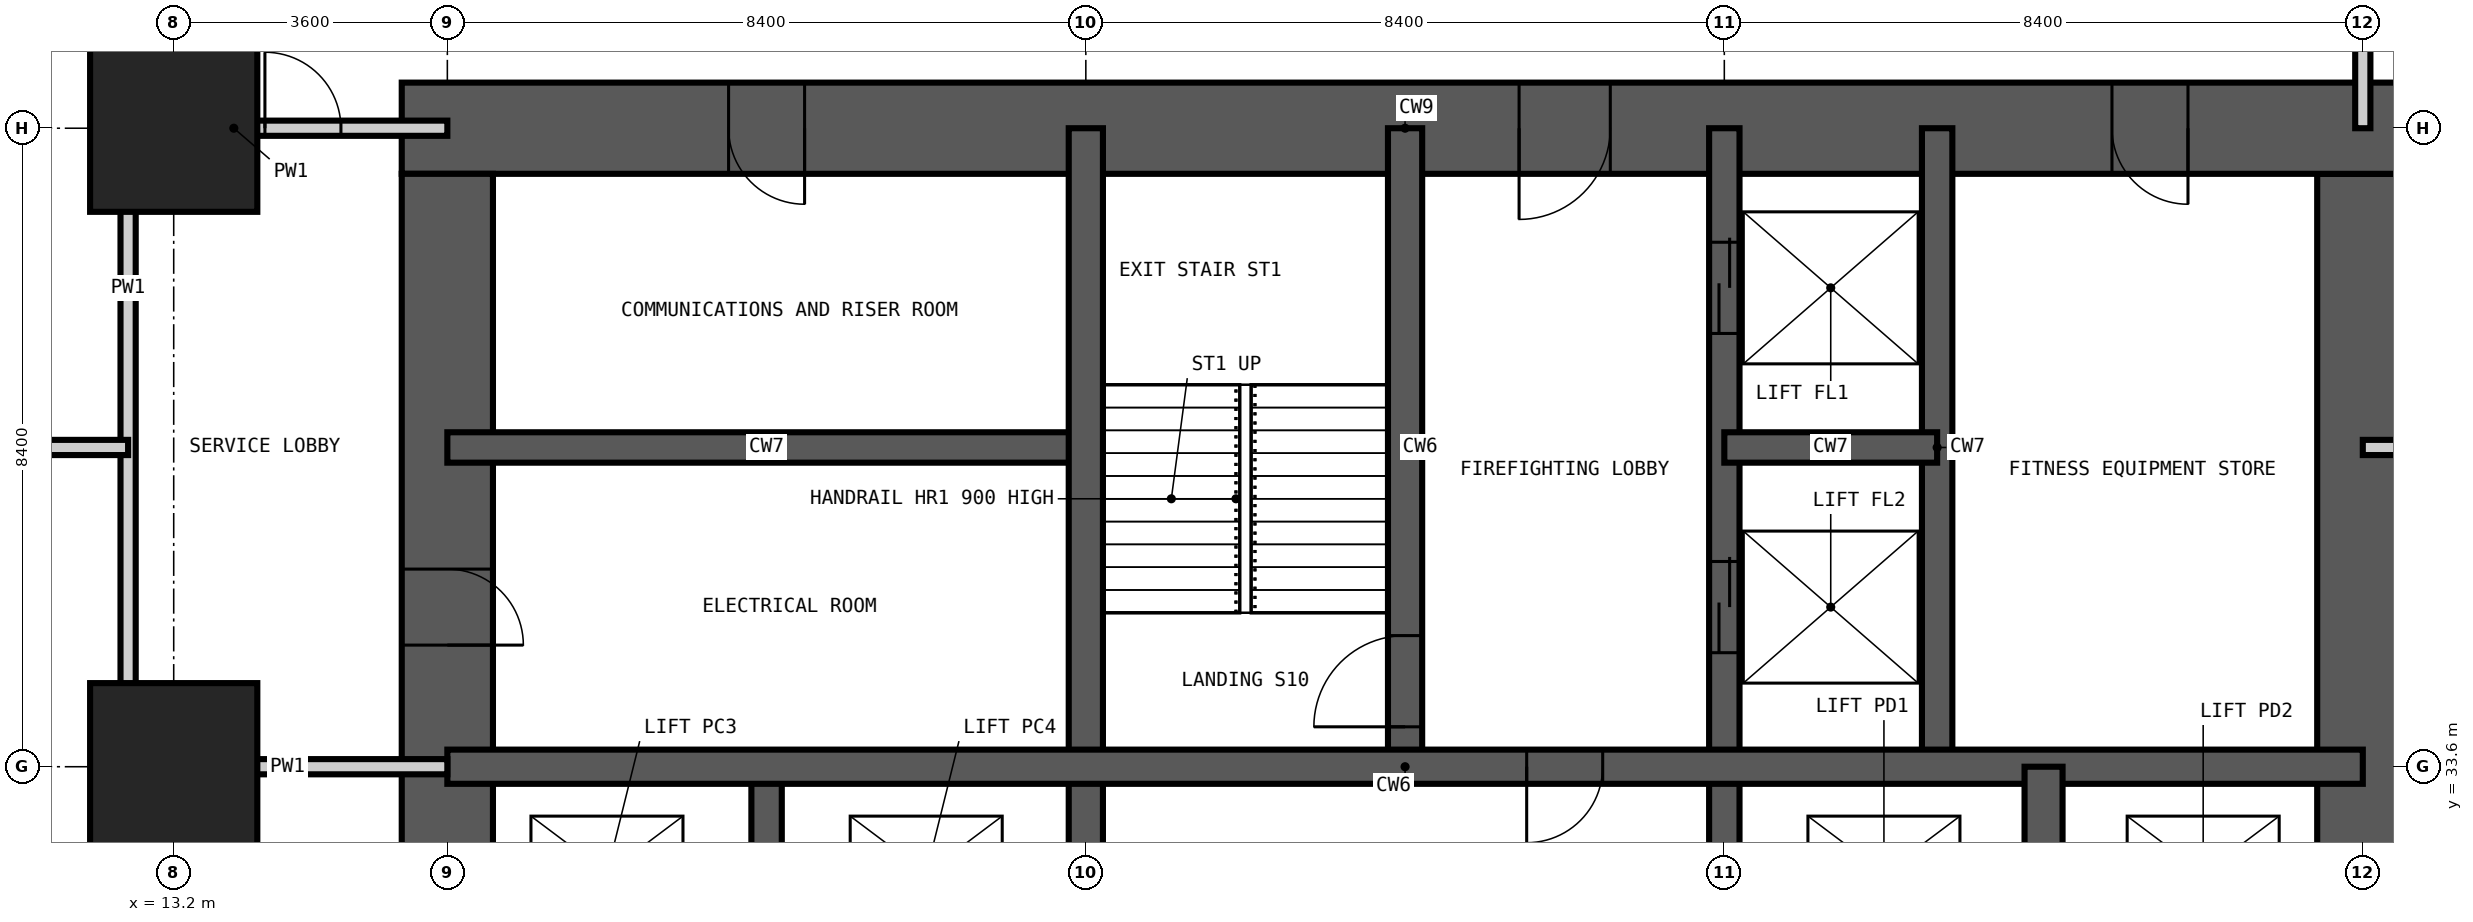
"""IFC4 building model, lengths in metres.
Left out: names, types, materials, properties, quantities, classifications, styles, units other than length and angle.
Written with IfcOpenShell. Run it as: python <this file> out.ifc"""

import sys

from ifc_helpers import new_model, si_unit, direction, frame, frame_2d, origin, origin_2d, place, context, subcontext, project, spatial, rectangle, extrude, element, fill, save


model = new_model("IFC4")
c1 = context("Model", 3, precision=1e-05, world=origin(), true_north=direction((0.0, 1.0)))
c2 = subcontext(c1, "Body", "Model", "MODEL_VIEW")
j1 = project(units=[si_unit("LENGTHUNIT", "METRE"), si_unit("PLANEANGLEUNIT", "RADIAN")], contexts=[c1])
p1 = place(None, origin())
s1 = spatial("IfcSite", under=j1, at=p1, CompositionType="ELEMENT")
p2 = place(p1, origin())
s2 = spatial("IfcBuilding", under=s1, at=p2, CompositionType="ELEMENT")
p3 = place(p2, frame((0.0, 0.0, 147.6)))
s3 = spatial("IfcBuildingStorey", under=s2, at=p3, CompositionType="ELEMENT", Elevation=147.6)
for number, where, z_axis, x_axis in (
    (1, (13.2, 33.6, -0.35), (0.0, 0.0, 1.0), (1.0, 0.0, 0.0)),
    (2, (13.2, 42.0, -0.35), (0.0, 0.0, 1.0), (1.0, 0.0, 0.0)),
):
    element("IfcColumn", number, at=place(p3, frame(where, z_axis=z_axis, x_axis=x_axis)), inside=s3, PredefinedType="COLUMN", context=c2, shape_type="SweptSolid", body=[
        extrude(rectangle(XDim=2.2, YDim=2.2, at=origin_2d()), origin(), (0.0, 0.0, 1.0), 5.95),
    ])
p4 = place(p3, frame((42.0, 17.4, -0.35), z_axis=(0.0, 0.0, 1.0), x_axis=(0.0, 1.0, 0.0)))
e3 = element("IfcWall", 3, at=p4, inside=s3, PredefinedType="SHEAR", context=c2, shape_type="SweptSolid", body=[
    extrude(rectangle(XDim=24.0, YDim=1.2, at=frame_2d((12.0, 0.0))), origin(), (0.0, 0.0, 1.0), 5.95),
])
p5 = place(p4, frame((0.2, 0.0, 0.35)))
e4 = element("IfcOpeningElement", 4, at=p5, cuts=e3, PredefinedType="OPENING", context=c2, shape_type="SweptSolid", body=[
    extrude(rectangle(XDim=1.2, YDim=2.2, at=frame_2d((0.6, 1.1))), frame((0.0, 0.61, 0.0), z_axis=(0.0, -1.0, 0.0), x_axis=(1.0, 0.0, 0.0)), (0.0, 0.0, 1.0), 1.22),
])
p6 = place(p4, frame((11.1, 0.0, 0.35)))
e5 = element("IfcOpeningElement", 5, at=p6, cuts=e3, PredefinedType="OPENING", context=c2, shape_type="SweptSolid", body=[
    extrude(rectangle(XDim=1.8, YDim=2.2, at=frame_2d((0.9, 1.1))), frame((0.0, 0.61, 0.0), z_axis=(0.0, -1.0, 0.0), x_axis=(1.0, 0.0, 0.0)), (0.0, 0.0, 1.0), 1.22),
])
p7 = place(p3, frame((42.6, 42.0, -0.35), z_axis=(0.0, 0.0, 1.0), x_axis=(-1.0, 0.0, 0.0)))
e6 = element("IfcWall", 6, at=p7, inside=s3, PredefinedType="SHEAR", context=c2, shape_type="SweptSolid", body=[
    extrude(rectangle(XDim=26.4, YDim=1.2, at=frame_2d((13.2, 0.0))), origin(), (0.0, 0.0, 1.0), 5.95),
])
p8 = place(p7, frame((21.1, 0.0, 0.35)))
e7 = element("IfcOpeningElement", 7, at=p8, cuts=e6, PredefinedType="OPENING", context=c2, shape_type="SweptSolid", body=[
    extrude(rectangle(XDim=1.0, YDim=2.1, at=frame_2d((0.5, 1.05))), frame((0.0, 0.61, 0.0), z_axis=(0.0, -1.0, 0.0), x_axis=(1.0, 0.0, 0.0)), (0.0, 0.0, 1.0), 1.22),
])
p9 = place(p7, frame((10.5, 0.0, 0.35)))
e8 = element("IfcOpeningElement", 8, at=p9, cuts=e6, PredefinedType="OPENING", context=c2, shape_type="SweptSolid", body=[
    extrude(rectangle(XDim=1.2, YDim=2.2, at=frame_2d((0.6, 1.1))), frame((0.0, 0.61, 0.0), z_axis=(0.0, -1.0, 0.0), x_axis=(1.0, 0.0, 0.0)), (0.0, 0.0, 1.0), 1.22),
])
p10 = place(p7, frame((2.9, 0.0, 0.35)))
e9 = element("IfcOpeningElement", 9, at=p10, cuts=e6, PredefinedType="OPENING", context=c2, shape_type="SweptSolid", body=[
    extrude(rectangle(XDim=1.0, YDim=2.1, at=frame_2d((0.5, 1.05))), frame((0.0, 0.61, 0.0), z_axis=(0.0, -1.0, 0.0), x_axis=(1.0, 0.0, 0.0)), (0.0, 0.0, 1.0), 1.22),
])
p11 = place(p3, frame((16.8, 41.4, -0.35), z_axis=(0.0, 0.0, 1.0), x_axis=(0.0, -1.0, 0.0)))
e10 = element("IfcWall", 10, at=p11, inside=s3, PredefinedType="SHEAR", context=c2, shape_type="SweptSolid", body=[
    extrude(rectangle(XDim=24.0, YDim=1.2, at=frame_2d((12.0, 0.0))), origin(), (0.0, 0.0, 1.0), 5.95),
])
p12 = place(p11, frame((11.1, 0.0, 0.35)))
e11 = element("IfcOpeningElement", 11, at=p12, cuts=e10, PredefinedType="OPENING", context=c2, shape_type="SweptSolid", body=[
    extrude(rectangle(XDim=1.8, YDim=2.2, at=frame_2d((0.9, 1.1))), frame((0.0, 0.61, 0.0), z_axis=(0.0, -1.0, 0.0), x_axis=(1.0, 0.0, 0.0)), (0.0, 0.0, 1.0), 1.22),
])
p13 = place(p11, frame((19.5, 0.0, 0.35)))
e12 = element("IfcOpeningElement", 12, at=p13, cuts=e10, PredefinedType="OPENING", context=c2, shape_type="SweptSolid", body=[
    extrude(rectangle(XDim=1.8, YDim=2.2, at=frame_2d((0.9, 1.1))), frame((0.0, 0.61, 0.0), z_axis=(0.0, -1.0, 0.0), x_axis=(1.0, 0.0, 0.0)), (0.0, 0.0, 1.0), 1.22),
])
p14 = place(p11, frame((5.2, 0.0, 0.35)))
e13 = element("IfcOpeningElement", 13, at=p14, cuts=e10, PredefinedType="OPENING", context=c2, shape_type="SweptSolid", body=[
    extrude(rectangle(XDim=1.0, YDim=2.1, at=frame_2d((0.5, 1.05))), frame((0.0, 0.61, 0.0), z_axis=(0.0, -1.0, 0.0), x_axis=(1.0, 0.0, 0.0)), (0.0, 0.0, 1.0), 1.22),
])
p15 = place(p3, frame((21.0, 30.8, -0.35), z_axis=(0.0, 0.0, 1.0), x_axis=(0.0, 1.0, 0.0)))
e14 = element("IfcWall", 14, at=p15, inside=s3, PredefinedType="SHEAR", context=c2, shape_type="SweptSolid", body=[
    extrude(rectangle(XDim=2.8, YDim=0.4, at=frame_2d((1.4, 0.0))), origin(), (0.0, 0.0, 1.0), 5.95),
])
p16 = place(p3, frame((33.6, 16.8, -0.35), z_axis=(0.0, 0.0, 1.0), x_axis=(0.0, 1.0, 0.0)))
e15 = element("IfcWall", 15, at=p16, inside=s3, PredefinedType="SHEAR", context=c2, shape_type="SweptSolid", body=[
    extrude(rectangle(XDim=25.2, YDim=0.4, at=frame_2d((12.6, 0.0))), origin(), (0.0, 0.0, 1.0), 5.95),
])
p17 = place(p16, frame((22.5, 0.0, 0.35)))
e16 = element("IfcOpeningElement", 16, at=p17, cuts=e15, PredefinedType="OPENING", context=c2, shape_type="SweptSolid", body=[
    extrude(rectangle(XDim=1.2, YDim=2.2, at=frame_2d((0.6, 1.1))), frame((0.0, 0.21, 0.0), z_axis=(0.0, -1.0, 0.0), x_axis=(1.0, 0.0, 0.0)), (0.0, 0.0, 1.0), 0.42),
])
p18 = place(p16, frame((18.3, 0.0, 0.35)))
e17 = element("IfcOpeningElement", 17, at=p18, cuts=e15, PredefinedType="OPENING", context=c2, shape_type="SweptSolid", body=[
    extrude(rectangle(XDim=1.2, YDim=2.2, at=frame_2d((0.6, 1.1))), frame((0.0, 0.21, 0.0), z_axis=(0.0, -1.0, 0.0), x_axis=(1.0, 0.0, 0.0)), (0.0, 0.0, 1.0), 0.42),
])
for number, where, z_axis, x_axis in (
    (18, (36.4, 33.6, -0.35), (0.0, 0.0, 1.0), (0.0, 1.0, 0.0)),
    (19, (16.8, 37.8, -0.35), (0.0, 0.0, 1.0), (1.0, 0.0, 0.0)),
):
    element("IfcWall", number, at=place(p3, frame(where, z_axis=z_axis, x_axis=x_axis)), inside=s3, PredefinedType="SHEAR", context=c2, shape_type="SweptSolid", body=[
        extrude(rectangle(XDim=8.4, YDim=0.4, at=frame_2d((4.2, 0.0))), origin(), (0.0, 0.0, 1.0), 5.95),
    ])
p19 = place(p3, frame((33.6, 37.8, -0.35), z_axis=(0.0, 0.0, 1.0), x_axis=(1.0, 0.0, 0.0)))
e20 = element("IfcWall", 20, at=p19, inside=s3, PredefinedType="SHEAR", context=c2, shape_type="SweptSolid", body=[
    extrude(rectangle(XDim=2.8, YDim=0.4, at=frame_2d((1.4, 0.0))), origin(), (0.0, 0.0, 1.0), 5.95),
])
p20 = place(p3, frame((25.2, 16.8, -0.35), z_axis=(0.0, 0.0, 1.0), x_axis=(0.0, 1.0, 0.0)))
e21 = element("IfcWall", 21, at=p20, inside=s3, PredefinedType="SHEAR", context=c2, shape_type="SweptSolid", body=[
    extrude(rectangle(XDim=25.2, YDim=0.45, at=frame_2d((12.6, 0.0))), origin(), (0.0, 0.0, 1.0), 5.95),
])
p21 = place(p3, frame((29.4, 33.6, -0.35), z_axis=(0.0, 0.0, 1.0), x_axis=(0.0, 1.0, 0.0)))
e22 = element("IfcWall", 22, at=p21, inside=s3, PredefinedType="SHEAR", context=c2, shape_type="SweptSolid", body=[
    extrude(rectangle(XDim=8.4, YDim=0.45, at=frame_2d((4.2, 0.0))), origin(), (0.0, 0.0, 1.0), 5.95),
])
p22 = place(p21, frame((0.525, 0.0, 0.35)))
e23 = element("IfcOpeningElement", 23, at=p22, cuts=e22, PredefinedType="OPENING", context=c2, shape_type="SweptSolid", body=[
    extrude(rectangle(XDim=1.2, YDim=2.2, at=frame_2d((0.6, 1.1))), frame((0.0, 0.235, 0.0), z_axis=(0.0, -1.0, 0.0), x_axis=(1.0, 0.0, 0.0)), (0.0, 0.0, 1.0), 0.47),
])
p23 = place(p3, frame((16.8, 33.6, -0.35), z_axis=(0.0, 0.0, 1.0), x_axis=(1.0, 0.0, 0.0)))
e24 = element("IfcWall", 24, at=p23, inside=s3, PredefinedType="SHEAR", context=c2, shape_type="SweptSolid", body=[
    extrude(rectangle(XDim=25.2, YDim=0.45, at=frame_2d((12.6, 0.0))), origin(), (0.0, 0.0, 1.0), 5.95),
])
p24 = place(p23, frame((14.2, 0.0, 0.35)))
e25 = element("IfcOpeningElement", 25, at=p24, cuts=e24, PredefinedType="OPENING", context=c2, shape_type="SweptSolid", body=[
    extrude(rectangle(XDim=1.0, YDim=2.1, at=frame_2d((0.5, 1.05))), frame((0.0, 0.235, 0.0), z_axis=(0.0, -1.0, 0.0), x_axis=(1.0, 0.0, 0.0)), (0.0, 0.0, 1.0), 0.47),
])
p25 = place(p3, frame((37.8, 30.8, -0.35), z_axis=(0.0, 0.0, 1.0), x_axis=(0.0, 1.0, 0.0)))
e26 = element("IfcWall", 26, at=p25, inside=s3, PredefinedType="SHEAR", context=c2, shape_type="SweptSolid", body=[
    extrude(rectangle(XDim=2.8, YDim=0.5, at=frame_2d((1.4, 0.0))), origin(), (0.0, 0.0, 1.0), 5.95),
])
p26 = place(p3, frame((12.6, 33.6, 0.0), z_axis=(0.0, 0.0, 1.0), x_axis=(0.0, 1.0, 0.0)))
e27 = element("IfcWall", 27, at=p26, inside=s3, PredefinedType="PARTITIONING", context=c2, shape_type="SweptSolid", body=[
    extrude(rectangle(XDim=12.6, YDim=0.2, at=frame_2d((6.3, 0.0))), origin(), (0.0, 0.0, 1.0), 5.6),
])
for number, where, z_axis, x_axis in (
    (28, (42.0, 42.0, 0.0), (0.0, 0.0, 1.0), (0.0, 1.0, 0.0)),
    (29, (12.6, 33.6, 0.0), (0.0, 0.0, 1.0), (1.0, 0.0, 0.0)),
):
    element("IfcWall", number, at=place(p3, frame(where, z_axis=z_axis, x_axis=x_axis)), inside=s3, PredefinedType="PARTITIONING", context=c2, shape_type="SweptSolid", body=[
        extrude(rectangle(XDim=4.2, YDim=0.2, at=frame_2d((2.1, 0.0))), origin(), (0.0, 0.0, 1.0), 5.6),
    ])
p27 = place(p3, frame((6.3, 37.8, 0.0), z_axis=(0.0, 0.0, 1.0), x_axis=(1.0, 0.0, 0.0)))
e30 = element("IfcWall", 30, at=p27, inside=s3, PredefinedType="PARTITIONING", context=c2, shape_type="SweptSolid", body=[
    extrude(rectangle(XDim=6.3, YDim=0.2, at=frame_2d((3.15, 0.0))), origin(), (0.0, 0.0, 1.0), 5.6),
])
p28 = place(p27, frame((2.25, 0.0, 0.0)))
e31 = element("IfcOpeningElement", 31, at=p28, cuts=e30, PredefinedType="OPENING", context=c2, shape_type="SweptSolid", body=[
    extrude(rectangle(XDim=1.8, YDim=2.4, at=frame_2d((0.9, 1.2))), frame((0.0, 0.11, 0.0), z_axis=(0.0, -1.0, 0.0), x_axis=(1.0, 0.0, 0.0)), (0.0, 0.0, 1.0), 0.22),
])
p29 = place(p3, frame((12.6, 42.0, 0.0), z_axis=(0.0, 0.0, 1.0), x_axis=(1.0, 0.0, 0.0)))
e32 = element("IfcWall", 32, at=p29, inside=s3, PredefinedType="PARTITIONING", context=c2, shape_type="SweptSolid", body=[
    extrude(rectangle(XDim=4.2, YDim=0.2, at=frame_2d((2.1, 0.0))), origin(), (0.0, 0.0, 1.0), 5.6),
])
p30 = place(p29, frame((1.8, 0.0, 0.0)))
e33 = element("IfcOpeningElement", 33, at=p30, cuts=e32, PredefinedType="OPENING", context=c2, shape_type="SweptSolid", body=[
    extrude(rectangle(XDim=1.0, YDim=2.1, at=frame_2d((0.5, 1.05))), frame((0.0, 0.11, 0.0), z_axis=(0.0, -1.0, 0.0), x_axis=(1.0, 0.0, 0.0)), (0.0, 0.0, 1.0), 0.22),
])
p31 = place(p3, frame((46.2, 37.8, 0.0), z_axis=(0.0, 0.0, 1.0), x_axis=(-1.0, 0.0, 0.0)))
e34 = element("IfcWall", 34, at=p31, inside=s3, PredefinedType="PARTITIONING", context=c2, shape_type="SweptSolid", body=[
    extrude(rectangle(XDim=4.2, YDim=0.2, at=frame_2d((2.1, 0.0))), origin(), (0.0, 0.0, 1.0), 5.6),
])
p32 = place(p31, frame((1.2, 0.0, 0.0)))
e35 = element("IfcOpeningElement", 35, at=p32, cuts=e34, PredefinedType="OPENING", context=c2, shape_type="SweptSolid", body=[
    extrude(rectangle(XDim=1.8, YDim=2.4, at=frame_2d((0.9, 1.2))), frame((0.0, 0.11, 0.0), z_axis=(0.0, -1.0, 0.0), x_axis=(1.0, 0.0, 0.0)), (0.0, 0.0, 1.0), 0.22),
])
p33 = place(p22, origin())
e36 = element("IfcDoor", 36, at=p33, inside=s3, OperationType="SINGLE_SWING_LEFT", PredefinedType="DOOR", context=c2, shape_type="SweptSolid", body=[
    extrude(rectangle(XDim=1.2, YDim=2.2, at=frame_2d((0.6, 1.1))), frame((0.0, 0.025, 0.0), z_axis=(0.0, -1.0, 0.0), x_axis=(1.0, 0.0, 0.0)), (0.0, 0.0, 1.0), 0.05),
])
fill(e23, e36)
p34 = place(p17, origin())
e37 = element("IfcDoor", 37, at=p34, inside=s3, OperationType="DOUBLE_DOOR_SLIDING", PredefinedType="DOOR", context=c2, shape_type="SweptSolid", body=[
    extrude(rectangle(XDim=1.2, YDim=2.2, at=frame_2d((0.6, 1.1))), frame((0.0, 0.025, 0.0), z_axis=(0.0, -1.0, 0.0), x_axis=(1.0, 0.0, 0.0)), (0.0, 0.0, 1.0), 0.05),
])
fill(e16, e37)
p35 = place(p18, origin())
e38 = element("IfcDoor", 38, at=p35, inside=s3, OperationType="DOUBLE_DOOR_SLIDING", PredefinedType="DOOR", context=c2, shape_type="SweptSolid", body=[
    extrude(rectangle(XDim=1.2, YDim=2.2, at=frame_2d((0.6, 1.1))), frame((0.0, 0.025, 0.0), z_axis=(0.0, -1.0, 0.0), x_axis=(1.0, 0.0, 0.0)), (0.0, 0.0, 1.0), 0.05),
])
fill(e17, e38)
p36 = place(p14, origin())
e39 = element("IfcDoor", 39, at=p36, inside=s3, OperationType="SINGLE_SWING_RIGHT", PredefinedType="DOOR", context=c2, shape_type="SweptSolid", body=[
    extrude(rectangle(XDim=1.0, YDim=2.1, at=frame_2d((0.5, 1.05))), frame((0.0, 0.025, 0.0), z_axis=(0.0, -1.0, 0.0), x_axis=(1.0, 0.0, 0.0)), (0.0, 0.0, 1.0), 0.05),
])
fill(e13, e39)
p37 = place(p8, origin())
e40 = element("IfcDoor", 40, at=p37, inside=s3, OperationType="SINGLE_SWING_LEFT", PredefinedType="DOOR", context=c2, shape_type="SweptSolid", body=[
    extrude(rectangle(XDim=1.0, YDim=2.1, at=frame_2d((0.5, 1.05))), frame((0.0, 0.025, 0.0), z_axis=(0.0, -1.0, 0.0), x_axis=(1.0, 0.0, 0.0)), (0.0, 0.0, 1.0), 0.05),
])
fill(e7, e40)
p38 = place(p24, frame((1.0, 0.0, 0.0), z_axis=(0.0, 0.0, 1.0), x_axis=(-1.0, 0.0, 0.0)))
e41 = element("IfcDoor", 41, at=p38, inside=s3, OperationType="SINGLE_SWING_RIGHT", PredefinedType="DOOR", context=c2, shape_type="SweptSolid", body=[
    extrude(rectangle(XDim=1.0, YDim=2.1, at=frame_2d((0.5, 1.05))), frame((0.0, 0.025, 0.0), z_axis=(0.0, -1.0, 0.0), x_axis=(1.0, 0.0, 0.0)), (0.0, 0.0, 1.0), 0.05),
])
fill(e25, e41)
p39 = place(p9, origin())
e42 = element("IfcDoor", 42, at=p39, inside=s3, OperationType="SINGLE_SWING_RIGHT", PredefinedType="DOOR", context=c2, shape_type="SweptSolid", body=[
    extrude(rectangle(XDim=1.2, YDim=2.2, at=frame_2d((0.6, 1.1))), frame((0.0, 0.025, 0.0), z_axis=(0.0, -1.0, 0.0), x_axis=(1.0, 0.0, 0.0)), (0.0, 0.0, 1.0), 0.05),
])
fill(e8, e42)
p40 = place(p10, origin())
e43 = element("IfcDoor", 43, at=p40, inside=s3, OperationType="SINGLE_SWING_LEFT", PredefinedType="DOOR", context=c2, shape_type="SweptSolid", body=[
    extrude(rectangle(XDim=1.0, YDim=2.1, at=frame_2d((0.5, 1.05))), frame((0.0, 0.025, 0.0), z_axis=(0.0, -1.0, 0.0), x_axis=(1.0, 0.0, 0.0)), (0.0, 0.0, 1.0), 0.05),
])
fill(e9, e43)
p41 = place(p30, origin())
e44 = element("IfcDoor", 44, at=p41, inside=s3, OperationType="SINGLE_SWING_LEFT", PredefinedType="DOOR", context=c2, shape_type="SweptSolid", body=[
    extrude(rectangle(XDim=1.0, YDim=2.1, at=frame_2d((0.5, 1.05))), frame((0.0, 0.025, 0.0), z_axis=(0.0, -1.0, 0.0), x_axis=(1.0, 0.0, 0.0)), (0.0, 0.0, 1.0), 0.05),
])
fill(e33, e44)
save(model, sys.argv[1])
